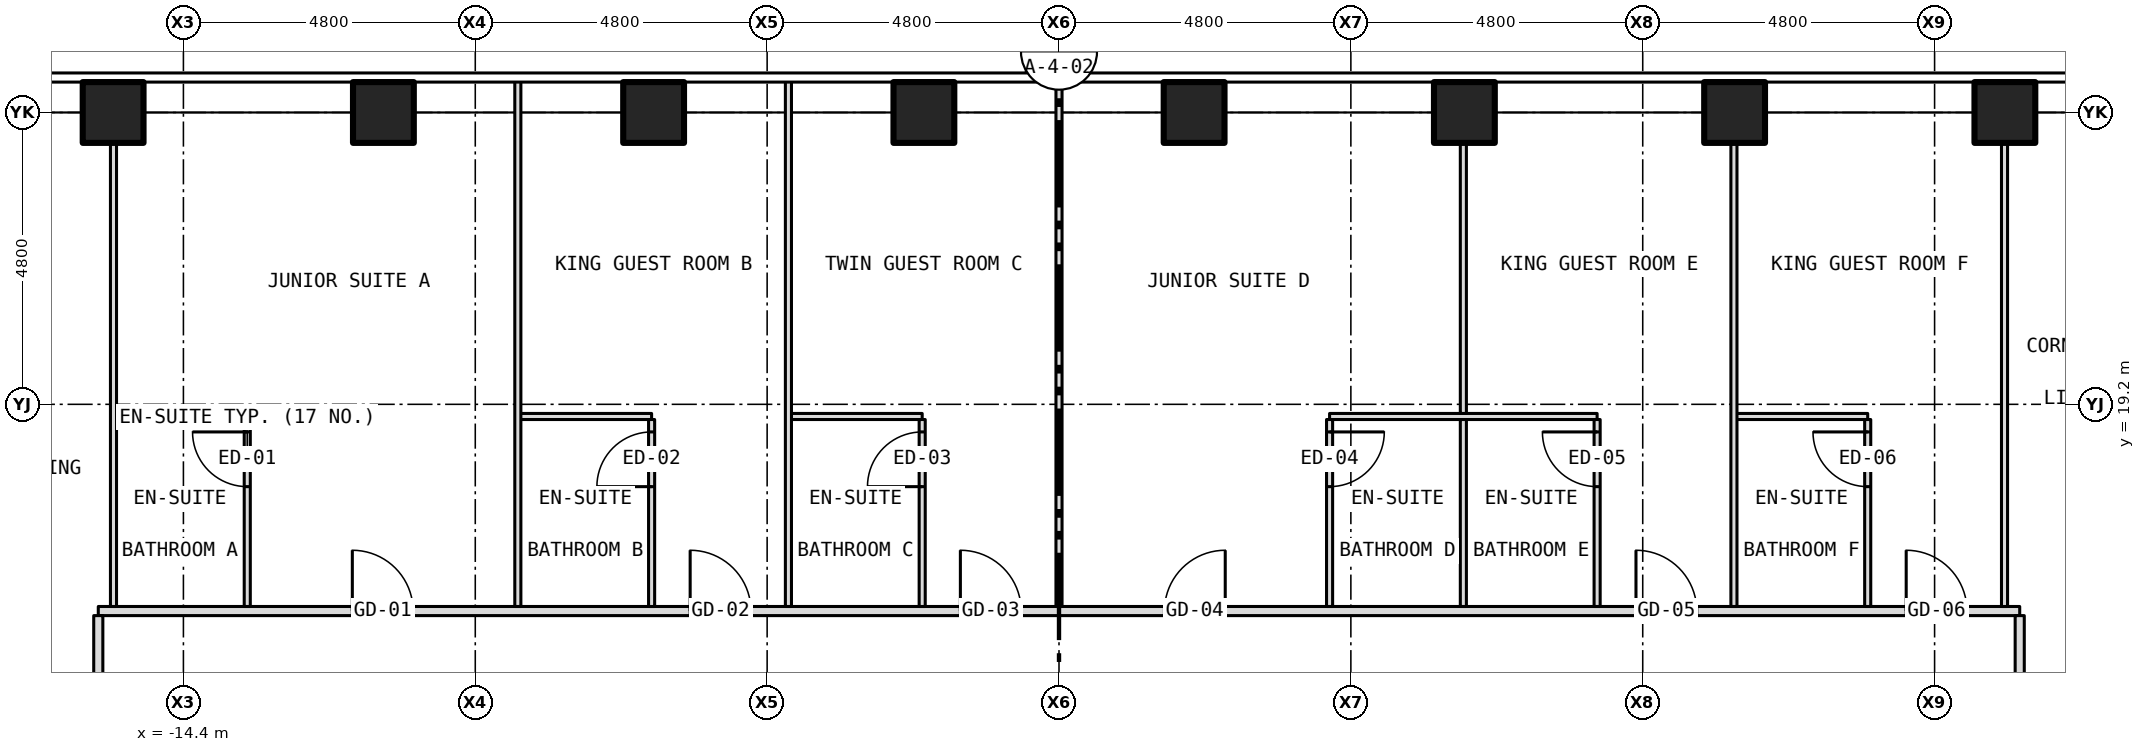
"""IFC4 building model, lengths in metres.
Left out: names, types, materials, properties, quantities, classifications, styles, units other than length and angle.
Written with IfcOpenShell. Run it as: python <this file> out.ifc"""

import sys

from ifc_helpers import new_model, si_unit, direction, frame, frame_2d, origin, origin_2d, place, context, subcontext, project, spatial, rectangle, hollow_rectangle, extrude, element, fill, save


model = new_model("IFC4")
c1 = context("Model", 3, precision=1e-05, world=origin(), true_north=direction((0.0, 1.0)))
c2 = subcontext(c1, "Body", "Model", "MODEL_VIEW")
j1 = project(units=[si_unit("LENGTHUNIT", "METRE"), si_unit("PLANEANGLEUNIT", "RADIAN")], contexts=[c1])
p1 = place(None, origin())
s1 = spatial("IfcSite", under=j1, at=p1, CompositionType="ELEMENT")
p2 = place(p1, origin())
s2 = spatial("IfcBuilding", under=s1, at=p2, CompositionType="ELEMENT")
p3 = place(p2, frame((0.0, 0.0, 49.5)))
s3 = spatial("IfcBuildingStorey", under=s2, at=p3, CompositionType="ELEMENT", Elevation=49.5)
for number, where, z_axis, x_axis in (
    (1, (-15.556, 24.0, -0.15), (0.0, 0.0, 1.0), (1.0, 0.0, 0.0)),
    (2, (-11.111, 24.0, -0.15), (0.0, 0.0, 1.0), (1.0, 0.0, 0.0)),
    (3, (-6.667, 24.0, -0.15), (0.0, 0.0, 1.0), (1.0, 0.0, 0.0)),
    (4, (-2.222, 24.0, -0.15), (0.0, 0.0, 1.0), (1.0, 0.0, 0.0)),
    (5, (2.222, 24.0, -0.15), (0.0, 0.0, 1.0), (1.0, 0.0, 0.0)),
    (6, (6.667, 24.0, -0.15), (0.0, 0.0, 1.0), (1.0, 0.0, 0.0)),
    (7, (11.111, 24.0, -0.15), (0.0, 0.0, 1.0), (1.0, 0.0, 0.0)),
    (8, (15.556, 24.0, -0.15), (0.0, 0.0, 1.0), (1.0, 0.0, 0.0)),
):
    element("IfcColumn", number, at=place(p3, frame(where, z_axis=z_axis, x_axis=x_axis)), inside=s3, PredefinedType="COLUMN", context=c2, shape_type="SweptSolid", body=[
        extrude(hollow_rectangle(XDim=1.0, YDim=1.0, WallThickness=0.06, at=origin_2d()), origin(), (0.0, 0.0, 1.0), 3.5),
    ])
p4 = place(p3, frame((-15.8, 15.8, 0.0), z_axis=(0.0, 0.0, 1.0), x_axis=(1.0, 0.0, 0.0)))
e9 = element("IfcWall", 9, at=p4, inside=s3, PredefinedType="PARTITIONING", context=c2, shape_type="SweptSolid", body=[
    extrude(rectangle(XDim=31.6, YDim=0.15, at=frame_2d((15.8, 0.0))), origin(), (0.0, 0.0, 1.0), 3.35),
])
p5 = place(p4, frame((4.178, 0.0, 0.0)))
e10 = element("IfcOpeningElement", 10, at=p5, cuts=e9, PredefinedType="OPENING", context=c2, shape_type="SweptSolid", body=[
    extrude(rectangle(XDim=1.0, YDim=2.1, at=frame_2d((0.5, 1.05))), frame((0.0, 0.087, 0.0), z_axis=(0.0, -1.0, 0.0), x_axis=(1.0, 0.0, 0.0)), (0.0, 0.0, 1.0), 0.174),
])
p6 = place(p4, frame((9.734, 0.0, 0.0)))
e11 = element("IfcOpeningElement", 11, at=p6, cuts=e9, PredefinedType="OPENING", context=c2, shape_type="SweptSolid", body=[
    extrude(rectangle(XDim=1.0, YDim=2.1, at=frame_2d((0.5, 1.05))), frame((0.0, 0.087, 0.0), z_axis=(0.0, -1.0, 0.0), x_axis=(1.0, 0.0, 0.0)), (0.0, 0.0, 1.0), 0.174),
])
p7 = place(p4, frame((14.178, 0.0, 0.0)))
e12 = element("IfcOpeningElement", 12, at=p7, cuts=e9, PredefinedType="OPENING", context=c2, shape_type="SweptSolid", body=[
    extrude(rectangle(XDim=1.0, YDim=2.1, at=frame_2d((0.5, 1.05))), frame((0.0, 0.087, 0.0), z_axis=(0.0, -1.0, 0.0), x_axis=(1.0, 0.0, 0.0)), (0.0, 0.0, 1.0), 0.174),
])
p8 = place(p4, frame((17.534, 0.0, 0.0)))
e13 = element("IfcOpeningElement", 13, at=p8, cuts=e9, PredefinedType="OPENING", context=c2, shape_type="SweptSolid", body=[
    extrude(rectangle(XDim=1.0, YDim=2.1, at=frame_2d((0.5, 1.05))), frame((0.0, 0.087, 0.0), z_axis=(0.0, -1.0, 0.0), x_axis=(1.0, 0.0, 0.0)), (0.0, 0.0, 1.0), 0.174),
])
p9 = place(p4, frame((25.289, 0.0, 0.0)))
e14 = element("IfcOpeningElement", 14, at=p9, cuts=e9, PredefinedType="OPENING", context=c2, shape_type="SweptSolid", body=[
    extrude(rectangle(XDim=1.0, YDim=2.1, at=frame_2d((0.5, 1.05))), frame((0.0, 0.087, 0.0), z_axis=(0.0, -1.0, 0.0), x_axis=(1.0, 0.0, 0.0)), (0.0, 0.0, 1.0), 0.174),
])
p10 = place(p4, frame((29.733, 0.0, 0.0)))
e15 = element("IfcOpeningElement", 15, at=p10, cuts=e9, PredefinedType="OPENING", context=c2, shape_type="SweptSolid", body=[
    extrude(rectangle(XDim=1.0, YDim=2.1, at=frame_2d((0.5, 1.05))), frame((0.0, 0.087, 0.0), z_axis=(0.0, -1.0, 0.0), x_axis=(1.0, 0.0, 0.0)), (0.0, 0.0, 1.0), 0.174),
])
for number, where, z_axis, x_axis in (
    (16, (-15.55, 19.0, 0.0), (0.0, 0.0, 1.0), (1.0, 0.0, 0.0)),
    (17, (-8.9, 19.0, 0.0), (0.0, 0.0, 1.0), (1.0, 0.0, 0.0)),
    (18, (-4.45, 19.0, 0.0), (0.0, 0.0, 1.0), (1.0, 0.0, 0.0)),
):
    element("IfcWall", number, at=place(p3, frame(where, z_axis=z_axis, x_axis=x_axis)), inside=s3, PredefinedType="PARTITIONING", context=c2, shape_type="SweptSolid", body=[
        extrude(rectangle(XDim=2.2, YDim=0.1, at=frame_2d((1.1, 0.0))), origin(), (0.0, 0.0, 1.0), 3.35),
    ])
p11 = place(p3, frame((4.45, 19.0, 0.0), z_axis=(0.0, 0.0, 1.0), x_axis=(1.0, 0.0, 0.0)))
e19 = element("IfcWall", 19, at=p11, inside=s3, PredefinedType="PARTITIONING", context=c2, shape_type="SweptSolid", body=[
    extrude(rectangle(XDim=4.4, YDim=0.1, at=frame_2d((2.2, 0.0))), origin(), (0.0, 0.0, 1.0), 3.35),
])
p12 = place(p3, frame((11.1, 19.0, 0.0), z_axis=(0.0, 0.0, 1.0), x_axis=(1.0, 0.0, 0.0)))
e20 = element("IfcWall", 20, at=p12, inside=s3, PredefinedType="PARTITIONING", context=c2, shape_type="SweptSolid", body=[
    extrude(rectangle(XDim=2.2, YDim=0.1, at=frame_2d((1.1, 0.0))), origin(), (0.0, 0.0, 1.0), 3.35),
])
p13 = place(p3, frame((-15.8, 10.92, 0.0), z_axis=(0.0, 0.0, 1.0), x_axis=(0.0, 1.0, 0.0)))
e21 = element("IfcWall", 21, at=p13, inside=s3, PredefinedType="PARTITIONING", context=c2, shape_type="SweptSolid", body=[
    extrude(rectangle(XDim=4.805, YDim=0.15, at=frame_2d((2.403, 0.0))), origin(), (0.0, 0.0, 1.0), 3.35),
])
p14 = place(p13, frame((0.78, 0.0, 0.0)))
e22 = element("IfcOpeningElement", 22, at=p14, cuts=e21, PredefinedType="OPENING", context=c2, shape_type="SweptSolid", body=[
    extrude(rectangle(XDim=1.0, YDim=2.1, at=frame_2d((0.5, 1.05))), frame((0.0, 0.087, 0.0), z_axis=(0.0, -1.0, 0.0), x_axis=(1.0, 0.0, 0.0)), (0.0, 0.0, 1.0), 0.174),
])
p15 = place(p3, frame((-15.55, 15.875, 0.0), z_axis=(0.0, 0.0, 1.0), x_axis=(0.0, 1.0, 0.0)))
e23 = element("IfcWall", 23, at=p15, inside=s3, PredefinedType="PARTITIONING", context=c2, shape_type="SweptSolid", body=[
    extrude(rectangle(XDim=8.005, YDim=0.1, at=frame_2d((4.002, 0.0))), origin(), (0.0, 0.0, 1.0), 3.35),
])
p16 = place(p3, frame((-13.35, 15.875, 0.0), z_axis=(0.0, 0.0, 1.0), x_axis=(0.0, 1.0, 0.0)))
e24 = element("IfcWall", 24, at=p16, inside=s3, PredefinedType="PARTITIONING", context=c2, shape_type="SweptSolid", body=[
    extrude(rectangle(XDim=3.075, YDim=0.1, at=frame_2d((1.538, 0.0))), origin(), (0.0, 0.0, 1.0), 3.35),
])
p17 = place(p16, frame((1.971, 0.0, 0.0)))
e25 = element("IfcOpeningElement", 25, at=p17, cuts=e24, PredefinedType="OPENING", context=c2, shape_type="SweptSolid", body=[
    extrude(rectangle(XDim=0.9, YDim=2.1, at=frame_2d((0.45, 1.05))), frame((0.0, 0.062, 0.0), z_axis=(0.0, -1.0, 0.0), x_axis=(1.0, 0.0, 0.0)), (0.0, 0.0, 1.0), 0.124),
])
p18 = place(p3, frame((-8.9, 15.875, 0.0), z_axis=(0.0, 0.0, 1.0), x_axis=(0.0, 1.0, 0.0)))
e26 = element("IfcWall", 26, at=p18, inside=s3, PredefinedType="PARTITIONING", context=c2, shape_type="SweptSolid", body=[
    extrude(rectangle(XDim=8.655, YDim=0.1, at=frame_2d((4.328, 0.0))), origin(), (0.0, 0.0, 1.0), 3.35),
])
p19 = place(p3, frame((-6.7, 15.875, 0.0), z_axis=(0.0, 0.0, 1.0), x_axis=(0.0, 1.0, 0.0)))
e27 = element("IfcWall", 27, at=p19, inside=s3, PredefinedType="PARTITIONING", context=c2, shape_type="SweptSolid", body=[
    extrude(rectangle(XDim=3.075, YDim=0.1, at=frame_2d((1.538, 0.0))), origin(), (0.0, 0.0, 1.0), 3.35),
])
p20 = place(p19, frame((1.971, 0.0, 0.0)))
e28 = element("IfcOpeningElement", 28, at=p20, cuts=e27, PredefinedType="OPENING", context=c2, shape_type="SweptSolid", body=[
    extrude(rectangle(XDim=0.9, YDim=2.1, at=frame_2d((0.45, 1.05))), frame((0.0, 0.062, 0.0), z_axis=(0.0, -1.0, 0.0), x_axis=(1.0, 0.0, 0.0)), (0.0, 0.0, 1.0), 0.124),
])
p21 = place(p3, frame((-4.45, 15.875, 0.0), z_axis=(0.0, 0.0, 1.0), x_axis=(0.0, 1.0, 0.0)))
e29 = element("IfcWall", 29, at=p21, inside=s3, PredefinedType="PARTITIONING", context=c2, shape_type="SweptSolid", body=[
    extrude(rectangle(XDim=8.655, YDim=0.1, at=frame_2d((4.328, 0.0))), origin(), (0.0, 0.0, 1.0), 3.35),
])
p22 = place(p3, frame((-2.25, 15.875, 0.0), z_axis=(0.0, 0.0, 1.0), x_axis=(0.0, 1.0, 0.0)))
e30 = element("IfcWall", 30, at=p22, inside=s3, PredefinedType="PARTITIONING", context=c2, shape_type="SweptSolid", body=[
    extrude(rectangle(XDim=3.075, YDim=0.1, at=frame_2d((1.538, 0.0))), origin(), (0.0, 0.0, 1.0), 3.35),
])
p23 = place(p22, frame((1.971, 0.0, 0.0)))
e31 = element("IfcOpeningElement", 31, at=p23, cuts=e30, PredefinedType="OPENING", context=c2, shape_type="SweptSolid", body=[
    extrude(rectangle(XDim=0.9, YDim=2.1, at=frame_2d((0.45, 1.05))), frame((0.0, 0.062, 0.0), z_axis=(0.0, -1.0, 0.0), x_axis=(1.0, 0.0, 0.0)), (0.0, 0.0, 1.0), 0.124),
])
p24 = place(p3, frame((0.0, 15.875, 0.0), z_axis=(0.0, 0.0, 1.0), x_axis=(0.0, 1.0, 0.0)))
e32 = element("IfcWall", 32, at=p24, inside=s3, PredefinedType="PARTITIONING", context=c2, shape_type="SweptSolid", body=[
    extrude(rectangle(XDim=8.655, YDim=0.1, at=frame_2d((4.328, 0.0))), origin(), (0.0, 0.0, 1.0), 2.728),
])
p25 = place(p3, frame((4.45, 15.875, 0.0), z_axis=(0.0, 0.0, 1.0), x_axis=(0.0, 1.0, 0.0)))
e33 = element("IfcWall", 33, at=p25, inside=s3, PredefinedType="PARTITIONING", context=c2, shape_type="SweptSolid", body=[
    extrude(rectangle(XDim=3.075, YDim=0.1, at=frame_2d((1.538, 0.0))), origin(), (0.0, 0.0, 1.0), 3.35),
])
p26 = place(p25, frame((1.971, 0.0, 0.0)))
e34 = element("IfcOpeningElement", 34, at=p26, cuts=e33, PredefinedType="OPENING", context=c2, shape_type="SweptSolid", body=[
    extrude(rectangle(XDim=0.9, YDim=2.1, at=frame_2d((0.45, 1.05))), frame((0.0, 0.062, 0.0), z_axis=(0.0, -1.0, 0.0), x_axis=(1.0, 0.0, 0.0)), (0.0, 0.0, 1.0), 0.124),
])
p27 = place(p3, frame((6.65, 15.875, 0.0), z_axis=(0.0, 0.0, 1.0), x_axis=(0.0, 1.0, 0.0)))
e35 = element("IfcWall", 35, at=p27, inside=s3, PredefinedType="PARTITIONING", context=c2, shape_type="SweptSolid", body=[
    extrude(rectangle(XDim=3.075, YDim=0.1, at=frame_2d((1.538, 0.0))), origin(), (0.0, 0.0, 1.0), 3.35),
])
p28 = place(p3, frame((6.65, 19.05, 0.0), z_axis=(0.0, 0.0, 1.0), x_axis=(0.0, 1.0, 0.0)))
e36 = element("IfcWall", 36, at=p28, inside=s3, PredefinedType="PARTITIONING", context=c2, shape_type="SweptSolid", body=[
    extrude(rectangle(XDim=4.83, YDim=0.1, at=frame_2d((2.415, 0.0))), origin(), (0.0, 0.0, 1.0), 3.35),
])
p29 = place(p3, frame((8.85, 15.875, 0.0), z_axis=(0.0, 0.0, 1.0), x_axis=(0.0, 1.0, 0.0)))
e37 = element("IfcWall", 37, at=p29, inside=s3, PredefinedType="PARTITIONING", context=c2, shape_type="SweptSolid", body=[
    extrude(rectangle(XDim=3.075, YDim=0.1, at=frame_2d((1.538, 0.0))), origin(), (0.0, 0.0, 1.0), 3.35),
])
p30 = place(p29, frame((1.971, 0.0, 0.0)))
e38 = element("IfcOpeningElement", 38, at=p30, cuts=e37, PredefinedType="OPENING", context=c2, shape_type="SweptSolid", body=[
    extrude(rectangle(XDim=0.9, YDim=2.1, at=frame_2d((0.45, 1.05))), frame((0.0, 0.062, 0.0), z_axis=(0.0, -1.0, 0.0), x_axis=(1.0, 0.0, 0.0)), (0.0, 0.0, 1.0), 0.124),
])
p31 = place(p3, frame((11.1, 15.875, 0.0), z_axis=(0.0, 0.0, 1.0), x_axis=(0.0, 1.0, 0.0)))
e39 = element("IfcWall", 39, at=p31, inside=s3, PredefinedType="PARTITIONING", context=c2, shape_type="SweptSolid", body=[
    extrude(rectangle(XDim=8.005, YDim=0.1, at=frame_2d((4.002, 0.0))), origin(), (0.0, 0.0, 1.0), 3.35),
])
p32 = place(p3, frame((13.3, 15.875, 0.0), z_axis=(0.0, 0.0, 1.0), x_axis=(0.0, 1.0, 0.0)))
e40 = element("IfcWall", 40, at=p32, inside=s3, PredefinedType="PARTITIONING", context=c2, shape_type="SweptSolid", body=[
    extrude(rectangle(XDim=3.075, YDim=0.1, at=frame_2d((1.538, 0.0))), origin(), (0.0, 0.0, 1.0), 3.35),
])
p33 = place(p32, frame((1.971, 0.0, 0.0)))
e41 = element("IfcOpeningElement", 41, at=p33, cuts=e40, PredefinedType="OPENING", context=c2, shape_type="SweptSolid", body=[
    extrude(rectangle(XDim=0.9, YDim=2.1, at=frame_2d((0.45, 1.05))), frame((0.0, 0.062, 0.0), z_axis=(0.0, -1.0, 0.0), x_axis=(1.0, 0.0, 0.0)), (0.0, 0.0, 1.0), 0.124),
])
p34 = place(p3, frame((15.55, 15.875, 0.0), z_axis=(0.0, 0.0, 1.0), x_axis=(0.0, 1.0, 0.0)))
e42 = element("IfcWall", 42, at=p34, inside=s3, PredefinedType="PARTITIONING", context=c2, shape_type="SweptSolid", body=[
    extrude(rectangle(XDim=8.005, YDim=0.1, at=frame_2d((4.002, 0.0))), origin(), (0.0, 0.0, 1.0), 3.35),
])
p35 = place(p3, frame((15.8, 10.92, 0.0), z_axis=(0.0, 0.0, 1.0), x_axis=(0.0, 1.0, 0.0)))
e43 = element("IfcWall", 43, at=p35, inside=s3, PredefinedType="PARTITIONING", context=c2, shape_type="SweptSolid", body=[
    extrude(rectangle(XDim=4.805, YDim=0.15, at=frame_2d((2.403, 0.0))), origin(), (0.0, 0.0, 1.0), 3.35),
])
p36 = place(p35, frame((0.78, 0.0, 0.0)))
e44 = element("IfcOpeningElement", 44, at=p36, cuts=e43, PredefinedType="OPENING", context=c2, shape_type="SweptSolid", body=[
    extrude(rectangle(XDim=1.0, YDim=2.1, at=frame_2d((0.5, 1.05))), frame((0.0, 0.087, 0.0), z_axis=(0.0, -1.0, 0.0), x_axis=(1.0, 0.0, 0.0)), (0.0, 0.0, 1.0), 0.174),
])
p37 = place(p5, origin())
e45 = element("IfcDoor", 45, at=p37, inside=s3, OperationType="SINGLE_SWING_LEFT", PredefinedType="DOOR", context=c2, shape_type="SweptSolid", body=[
    extrude(rectangle(XDim=1.0, YDim=2.1, at=frame_2d((0.5, 1.05))), frame((0.0, 0.025, 0.0), z_axis=(0.0, -1.0, 0.0), x_axis=(1.0, 0.0, 0.0)), (0.0, 0.0, 1.0), 0.05),
])
fill(e10, e45)
p38 = place(p17, origin())
e46 = element("IfcDoor", 46, at=p38, inside=s3, OperationType="SINGLE_SWING_RIGHT", PredefinedType="DOOR", context=c2, shape_type="SweptSolid", body=[
    extrude(rectangle(XDim=0.9, YDim=2.1, at=frame_2d((0.45, 1.05))), frame((0.0, 0.025, 0.0), z_axis=(0.0, -1.0, 0.0), x_axis=(1.0, 0.0, 0.0)), (0.0, 0.0, 1.0), 0.05),
])
fill(e25, e46)
p39 = place(p6, origin())
e47 = element("IfcDoor", 47, at=p39, inside=s3, OperationType="SINGLE_SWING_LEFT", PredefinedType="DOOR", context=c2, shape_type="SweptSolid", body=[
    extrude(rectangle(XDim=1.0, YDim=2.1, at=frame_2d((0.5, 1.05))), frame((0.0, 0.025, 0.0), z_axis=(0.0, -1.0, 0.0), x_axis=(1.0, 0.0, 0.0)), (0.0, 0.0, 1.0), 0.05),
])
fill(e11, e47)
p40 = place(p20, origin())
e48 = element("IfcDoor", 48, at=p40, inside=s3, OperationType="SINGLE_SWING_LEFT", PredefinedType="DOOR", context=c2, shape_type="SweptSolid", body=[
    extrude(rectangle(XDim=0.9, YDim=2.1, at=frame_2d((0.45, 1.05))), frame((0.0, 0.025, 0.0), z_axis=(0.0, -1.0, 0.0), x_axis=(1.0, 0.0, 0.0)), (0.0, 0.0, 1.0), 0.05),
])
fill(e28, e48)
p41 = place(p7, origin())
e49 = element("IfcDoor", 49, at=p41, inside=s3, OperationType="SINGLE_SWING_LEFT", PredefinedType="DOOR", context=c2, shape_type="SweptSolid", body=[
    extrude(rectangle(XDim=1.0, YDim=2.1, at=frame_2d((0.5, 1.05))), frame((0.0, 0.025, 0.0), z_axis=(0.0, -1.0, 0.0), x_axis=(1.0, 0.0, 0.0)), (0.0, 0.0, 1.0), 0.05),
])
fill(e12, e49)
p42 = place(p23, origin())
e50 = element("IfcDoor", 50, at=p42, inside=s3, OperationType="SINGLE_SWING_LEFT", PredefinedType="DOOR", context=c2, shape_type="SweptSolid", body=[
    extrude(rectangle(XDim=0.9, YDim=2.1, at=frame_2d((0.45, 1.05))), frame((0.0, 0.025, 0.0), z_axis=(0.0, -1.0, 0.0), x_axis=(1.0, 0.0, 0.0)), (0.0, 0.0, 1.0), 0.05),
])
fill(e31, e50)
p43 = place(p8, origin())
e51 = element("IfcDoor", 51, at=p43, inside=s3, OperationType="SINGLE_SWING_RIGHT", PredefinedType="DOOR", context=c2, shape_type="SweptSolid", body=[
    extrude(rectangle(XDim=1.0, YDim=2.1, at=frame_2d((0.5, 1.05))), frame((0.0, 0.025, 0.0), z_axis=(0.0, -1.0, 0.0), x_axis=(1.0, 0.0, 0.0)), (0.0, 0.0, 1.0), 0.05),
])
fill(e13, e51)
p44 = place(p26, origin())
e52 = element("IfcDoor", 52, at=p44, inside=s3, OperationType="SINGLE_SWING_RIGHT", PredefinedType="DOOR", context=c2, shape_type="SweptSolid", body=[
    extrude(rectangle(XDim=0.9, YDim=2.1, at=frame_2d((0.45, 1.05))), frame((0.0, 0.025, 0.0), z_axis=(0.0, -1.0, 0.0), x_axis=(1.0, 0.0, 0.0)), (0.0, 0.0, 1.0), 0.05),
])
fill(e34, e52)
p45 = place(p9, origin())
e53 = element("IfcDoor", 53, at=p45, inside=s3, OperationType="SINGLE_SWING_LEFT", PredefinedType="DOOR", context=c2, shape_type="SweptSolid", body=[
    extrude(rectangle(XDim=1.0, YDim=2.1, at=frame_2d((0.5, 1.05))), frame((0.0, 0.025, 0.0), z_axis=(0.0, -1.0, 0.0), x_axis=(1.0, 0.0, 0.0)), (0.0, 0.0, 1.0), 0.05),
])
fill(e14, e53)
p46 = place(p30, origin())
e54 = element("IfcDoor", 54, at=p46, inside=s3, OperationType="SINGLE_SWING_RIGHT", PredefinedType="DOOR", context=c2, shape_type="SweptSolid", body=[
    extrude(rectangle(XDim=0.9, YDim=2.1, at=frame_2d((0.45, 1.05))), frame((0.0, 0.025, 0.0), z_axis=(0.0, -1.0, 0.0), x_axis=(1.0, 0.0, 0.0)), (0.0, 0.0, 1.0), 0.05),
])
fill(e38, e54)
p47 = place(p10, origin())
e55 = element("IfcDoor", 55, at=p47, inside=s3, OperationType="SINGLE_SWING_LEFT", PredefinedType="DOOR", context=c2, shape_type="SweptSolid", body=[
    extrude(rectangle(XDim=1.0, YDim=2.1, at=frame_2d((0.5, 1.05))), frame((0.0, 0.025, 0.0), z_axis=(0.0, -1.0, 0.0), x_axis=(1.0, 0.0, 0.0)), (0.0, 0.0, 1.0), 0.05),
])
fill(e15, e55)
p48 = place(p33, origin())
e56 = element("IfcDoor", 56, at=p48, inside=s3, OperationType="SINGLE_SWING_RIGHT", PredefinedType="DOOR", context=c2, shape_type="SweptSolid", body=[
    extrude(rectangle(XDim=0.9, YDim=2.1, at=frame_2d((0.45, 1.05))), frame((0.0, 0.025, 0.0), z_axis=(0.0, -1.0, 0.0), x_axis=(1.0, 0.0, 0.0)), (0.0, 0.0, 1.0), 0.05),
])
fill(e41, e56)
save(model, sys.argv[1])
